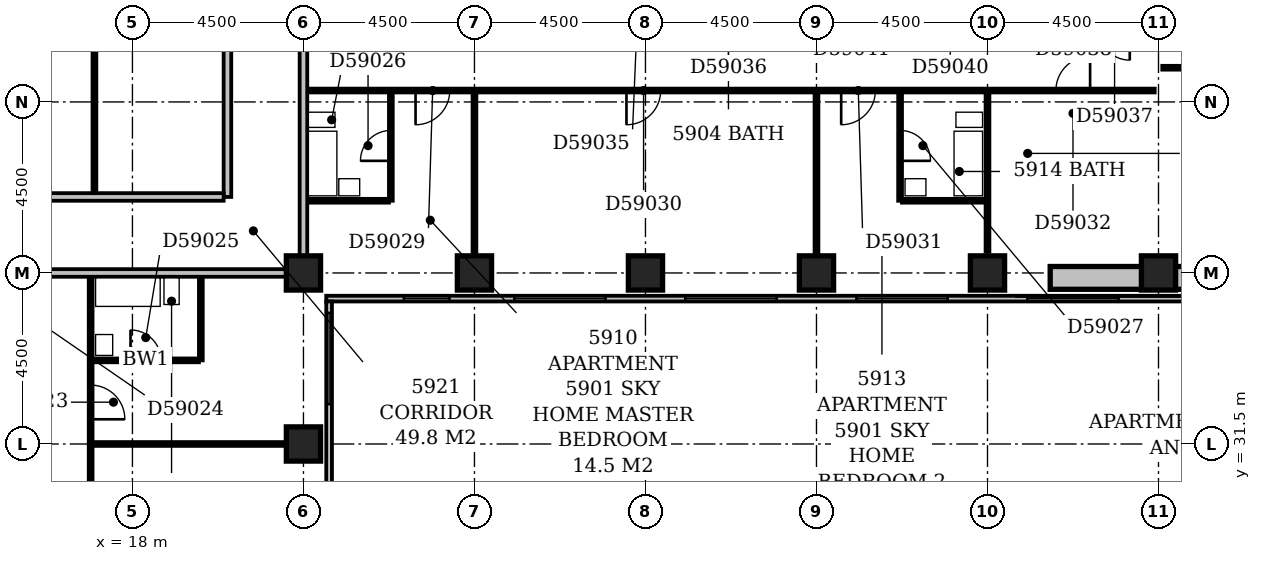
"""IFC4 building model, lengths in metres.
Left out: names, types, materials, properties, quantities, classifications, styles, units other than length and angle.
Written with IfcOpenShell. Run it as: python <this file> out.ifc"""

import sys

from ifc_helpers import new_model, si_unit, direction, frame, frame_2d, origin, origin_2d, place, context, subcontext, project, spatial, rectangle, extrude, element, fill, save


model = new_model("IFC4")
c1 = context("Model", 3, precision=1e-05, world=origin(), true_north=direction((0.0, 1.0)))
c2 = subcontext(c1, "Body", "Model", "MODEL_VIEW")
j1 = project(units=[si_unit("LENGTHUNIT", "METRE"), si_unit("PLANEANGLEUNIT", "RADIAN")], contexts=[c1])
p1 = place(None, origin())
s1 = spatial("IfcSite", under=j1, at=p1, CompositionType="ELEMENT")
p2 = place(p1, origin())
s2 = spatial("IfcBuilding", under=s1, at=p2, CompositionType="ELEMENT")
p3 = place(p2, frame((0.0, 0.0, 229.4)))
s3 = spatial("IfcBuildingStorey", under=s2, at=p3, CompositionType="ELEMENT", Elevation=229.4)
for number, where, z_axis, x_axis in (
    (1, (22.5, 31.5, -0.3), (0.0, 0.0, 1.0), (1.0, 0.0, 0.0)),
    (2, (22.5, 36.0, -0.3), (0.0, 0.0, 1.0), (1.0, 0.0, 0.0)),
    (3, (27.0, 36.0, -0.3), (0.0, 0.0, 1.0), (1.0, 0.0, 0.0)),
    (4, (31.5, 36.0, -0.3), (0.0, 0.0, 1.0), (1.0, 0.0, 0.0)),
    (5, (36.0, 36.0, -0.3), (0.0, 0.0, 1.0), (1.0, 0.0, 0.0)),
    (6, (40.5, 36.0, -0.3), (0.0, 0.0, 1.0), (1.0, 0.0, 0.0)),
    (7, (45.0, 36.0, -0.3), (0.0, 0.0, 1.0), (1.0, 0.0, 0.0)),
):
    element("IfcColumn", number, at=place(p3, frame(where, z_axis=z_axis, x_axis=x_axis)), inside=s3, PredefinedType="COLUMN", context=c2, shape_type="SweptSolid", body=[
        extrude(rectangle(XDim=0.9, YDim=0.9, at=origin_2d()), origin(), (0.0, 0.0, 1.0), 3.55),
    ])
p4 = place(p3, frame((23.175, 17.4, 0.0), z_axis=(0.0, 0.0, 1.0), x_axis=(0.0, 1.0, 0.0)))
e8 = element("IfcWall", 8, at=p4, inside=s3, PredefinedType="STANDARD", context=c2, shape_type="SweptSolid", body=[
    extrude(rectangle(XDim=17.85, YDim=0.15, at=frame_2d((8.925, 0.0))), origin(), (0.0, 0.0, 1.0), 2.7),
])
p5 = place(p4, frame((2.876, 0.0, 0.6)))
e9 = element("IfcOpeningElement", 9, at=p5, cuts=e8, PredefinedType="OPENING", context=c2, shape_type="SweptSolid", body=[
    extrude(rectangle(XDim=1.5, YDim=1.8, at=frame_2d((0.75, 0.9))), frame((0.0, 0.087, 0.0), z_axis=(0.0, -1.0, 0.0), x_axis=(1.0, 0.0, 0.0)), (0.0, 0.0, 1.0), 0.174),
])
p6 = place(p4, frame((6.15, 0.0, 0.6)))
e10 = element("IfcOpeningElement", 10, at=p6, cuts=e8, PredefinedType="OPENING", context=c2, shape_type="SweptSolid", body=[
    extrude(rectangle(XDim=2.4, YDim=1.8, at=frame_2d((1.2, 0.9))), frame((0.0, 0.087, 0.0), z_axis=(0.0, -1.0, 0.0), x_axis=(1.0, 0.0, 0.0)), (0.0, 0.0, 1.0), 0.174),
])
p7 = place(p4, frame((10.65, 0.0, 0.6)))
e11 = element("IfcOpeningElement", 11, at=p7, cuts=e8, PredefinedType="OPENING", context=c2, shape_type="SweptSolid", body=[
    extrude(rectangle(XDim=2.4, YDim=1.8, at=frame_2d((1.2, 0.9))), frame((0.0, 0.087, 0.0), z_axis=(0.0, -1.0, 0.0), x_axis=(1.0, 0.0, 0.0)), (0.0, 0.0, 1.0), 0.174),
])
p8 = place(p4, frame((15.15, 0.0, 0.6)))
e12 = element("IfcOpeningElement", 12, at=p8, cuts=e8, PredefinedType="OPENING", context=c2, shape_type="SweptSolid", body=[
    extrude(rectangle(XDim=2.4, YDim=1.8, at=frame_2d((1.2, 0.9))), frame((0.0, 0.087, 0.0), z_axis=(0.0, -1.0, 0.0), x_axis=(1.0, 0.0, 0.0)), (0.0, 0.0, 1.0), 0.174),
])
p9 = place(p3, frame((23.1, 35.325, 0.0), z_axis=(0.0, 0.0, 1.0), x_axis=(1.0, 0.0, 0.0)))
e13 = element("IfcWall", 13, at=p9, inside=s3, PredefinedType="STANDARD", context=c2, shape_type="SweptSolid", body=[
    extrude(rectangle(XDim=27.15, YDim=0.15, at=frame_2d((13.575, 0.0))), origin(), (0.0, 0.0, 1.0), 2.7),
])
p10 = place(p9, frame((2.043, 0.0, 0.6)))
e14 = element("IfcOpeningElement", 14, at=p10, cuts=e13, PredefinedType="OPENING", context=c2, shape_type="SweptSolid", body=[
    extrude(rectangle(XDim=1.2, YDim=1.8, at=frame_2d((0.6, 0.9))), frame((0.0, 0.087, 0.0), z_axis=(0.0, -1.0, 0.0), x_axis=(1.0, 0.0, 0.0)), (0.0, 0.0, 1.0), 0.174),
])
p11 = place(p9, frame((4.95, 0.0, 0.6)))
e15 = element("IfcOpeningElement", 15, at=p11, cuts=e13, PredefinedType="OPENING", context=c2, shape_type="SweptSolid", body=[
    extrude(rectangle(XDim=2.4, YDim=1.8, at=frame_2d((1.2, 0.9))), frame((0.0, 0.087, 0.0), z_axis=(0.0, -1.0, 0.0), x_axis=(1.0, 0.0, 0.0)), (0.0, 0.0, 1.0), 0.174),
])
p12 = place(p9, frame((9.45, 0.0, 0.6)))
e16 = element("IfcOpeningElement", 16, at=p12, cuts=e13, PredefinedType="OPENING", context=c2, shape_type="SweptSolid", body=[
    extrude(rectangle(XDim=2.4, YDim=1.8, at=frame_2d((1.2, 0.9))), frame((0.0, 0.087, 0.0), z_axis=(0.0, -1.0, 0.0), x_axis=(1.0, 0.0, 0.0)), (0.0, 0.0, 1.0), 0.174),
])
p13 = place(p9, frame((13.95, 0.0, 0.6)))
e17 = element("IfcOpeningElement", 17, at=p13, cuts=e13, PredefinedType="OPENING", context=c2, shape_type="SweptSolid", body=[
    extrude(rectangle(XDim=2.4, YDim=1.8, at=frame_2d((1.2, 0.9))), frame((0.0, 0.087, 0.0), z_axis=(0.0, -1.0, 0.0), x_axis=(1.0, 0.0, 0.0)), (0.0, 0.0, 1.0), 0.174),
])
p14 = place(p9, frame((18.45, 0.0, 0.6)))
e18 = element("IfcOpeningElement", 18, at=p14, cuts=e13, PredefinedType="OPENING", context=c2, shape_type="SweptSolid", body=[
    extrude(rectangle(XDim=2.4, YDim=1.8, at=frame_2d((1.2, 0.9))), frame((0.0, 0.087, 0.0), z_axis=(0.0, -1.0, 0.0), x_axis=(1.0, 0.0, 0.0)), (0.0, 0.0, 1.0), 0.174),
])
p15 = place(p9, frame((22.68, 0.0, 0.6)))
e19 = element("IfcOpeningElement", 19, at=p15, cuts=e13, PredefinedType="OPENING", context=c2, shape_type="SweptSolid", body=[
    extrude(rectangle(XDim=1.8, YDim=1.8, at=frame_2d((0.9, 0.9))), frame((0.0, 0.087, 0.0), z_axis=(0.0, -1.0, 0.0), x_axis=(1.0, 0.0, 0.0)), (0.0, 0.0, 1.0), 0.174),
])
p16 = place(p3, frame((49.53, 35.87, 3.6), z_axis=(0.0, 0.0, 1.0), x_axis=(-1.0, 0.0, 0.0)))
e20 = element("IfcWall", 20, at=p16, inside=s3, PredefinedType="STANDARD", context=c2, shape_type="SweptSolid", body=[
    extrude(rectangle(XDim=7.38, YDim=0.6, at=frame_2d((3.69, 0.0))), origin(), (0.0, 0.0, 1.0), 0.6),
])
p17 = place(p3, frame((16.9, 27.1, 0.0), z_axis=(0.0, 0.0, 1.0), x_axis=(0.0, 1.0, 0.0)))
e21 = element("IfcWall", 21, at=p17, inside=s3, PredefinedType="PARTITIONING", context=c2, shape_type="SweptSolid", body=[
    extrude(rectangle(XDim=8.8, YDim=0.1, at=frame_2d((4.4, 0.0))), origin(), (0.0, 0.0, 1.0), 3.25),
])
p18 = place(p17, frame((1.7, 0.0, 0.0)))
e22 = element("IfcOpeningElement", 22, at=p18, cuts=e21, PredefinedType="OPENING", context=c2, shape_type="SweptSolid", body=[
    extrude(rectangle(XDim=0.9, YDim=2.1, at=frame_2d((0.45, 1.05))), frame((0.0, 0.062, 0.0), z_axis=(0.0, -1.0, 0.0), x_axis=(1.0, 0.0, 0.0)), (0.0, 0.0, 1.0), 0.124),
])
p19 = place(p17, frame((5.05, 0.0, 0.0)))
e23 = element("IfcOpeningElement", 23, at=p19, cuts=e21, PredefinedType="OPENING", context=c2, shape_type="SweptSolid", body=[
    extrude(rectangle(XDim=0.9, YDim=2.1, at=frame_2d((0.45, 1.05))), frame((0.0, 0.062, 0.0), z_axis=(0.0, -1.0, 0.0), x_axis=(1.0, 0.0, 0.0)), (0.0, 0.0, 1.0), 0.124),
])
p20 = place(p3, frame((16.95, 31.5, 0.0), z_axis=(0.0, 0.0, 1.0), x_axis=(1.0, 0.0, 0.0)))
e24 = element("IfcWall", 24, at=p20, inside=s3, PredefinedType="PARTITIONING", context=c2, shape_type="SweptSolid", body=[
    extrude(rectangle(XDim=5.1, YDim=0.1, at=frame_2d((2.55, 0.0))), origin(), (0.0, 0.0, 1.0), 3.25),
])
p21 = place(p3, frame((16.95, 33.7, 0.0), z_axis=(0.0, 0.0, 1.0), x_axis=(1.0, 0.0, 0.0)))
e25 = element("IfcWall", 25, at=p21, inside=s3, PredefinedType="PLUMBINGWALL", context=c2, shape_type="SweptSolid", body=[
    extrude(rectangle(XDim=2.8, YDim=0.1, at=frame_2d((1.4, 0.0))), origin(), (0.0, 0.0, 1.0), 3.25),
])
p22 = place(p21, frame((1.0, 0.0, 0.0)))
e26 = element("IfcOpeningElement", 26, at=p22, cuts=e25, PredefinedType="OPENING", context=c2, shape_type="SweptSolid", body=[
    extrude(rectangle(XDim=0.8, YDim=2.1, at=frame_2d((0.4, 1.05))), frame((0.0, 0.062, 0.0), z_axis=(0.0, -1.0, 0.0), x_axis=(1.0, 0.0, 0.0)), (0.0, 0.0, 1.0), 0.124),
])
p23 = place(p3, frame((19.8, 33.7, 0.0), z_axis=(0.0, 0.0, 1.0), x_axis=(0.0, 1.0, 0.0)))
e27 = element("IfcWall", 27, at=p23, inside=s3, PredefinedType="PLUMBINGWALL", context=c2, shape_type="SweptSolid", body=[
    extrude(rectangle(XDim=2.2, YDim=0.1, at=frame_2d((1.1, 0.0))), origin(), (0.0, 0.0, 1.0), 3.25),
])
p24 = place(p3, frame((9.1, 36.0, 0.0), z_axis=(0.0, 0.0, 1.0), x_axis=(1.0, 0.0, 0.0)))
e28 = element("IfcWall", 28, at=p24, inside=s3, PredefinedType="PARTITIONING", context=c2, shape_type="SweptSolid", body=[
    extrude(rectangle(XDim=12.95, YDim=0.2, at=frame_2d((6.475, 0.0))), origin(), (0.0, 0.0, 1.0), 3.25),
])
p25 = place(p3, frame((22.5, 36.45, 0.0), z_axis=(0.0, 0.0, 1.0), x_axis=(0.0, 1.0, 0.0)))
e29 = element("IfcWall", 29, at=p25, inside=s3, PredefinedType="PARTITIONING", context=c2, shape_type="SweptSolid", body=[
    extrude(rectangle(XDim=13.05, YDim=0.2, at=frame_2d((6.525, 0.0))), origin(), (0.0, 0.0, 1.0), 3.25),
])
for number, where, z_axis, x_axis in (
    (30, (27.0, 36.45, 0.0), (0.0, 0.0, 1.0), (0.0, 1.0, 0.0)),
    (31, (36.0, 36.45, 0.0), (0.0, 0.0, 1.0), (0.0, 1.0, 0.0)),
):
    element("IfcWall", number, at=place(p3, frame(where, z_axis=z_axis, x_axis=x_axis)), inside=s3, PredefinedType="PARTITIONING", context=c2, shape_type="SweptSolid", body=[
        extrude(rectangle(XDim=4.3, YDim=0.1, at=frame_2d((2.15, 0.0))), origin(), (0.0, 0.0, 1.0), 2.35),
    ])
p26 = place(p3, frame((40.5, 36.566, 0.0), z_axis=(0.0, 0.0, 1.0), x_axis=(0.0, 1.0, 0.0)))
e32 = element("IfcWall", 32, at=p26, inside=s3, PredefinedType="PARTITIONING", context=c2, shape_type="SweptSolid", body=[
    extrude(rectangle(XDim=4.184, YDim=0.1, at=frame_2d((2.092, 0.0))), origin(), (0.0, 0.0, 1.0), 3.25),
])
p27 = place(p3, frame((22.6, 37.9, 0.0), z_axis=(0.0, 0.0, 1.0), x_axis=(1.0, 0.0, 0.0)))
e33 = element("IfcWall", 33, at=p27, inside=s3, PredefinedType="PLUMBINGWALL", context=c2, shape_type="SweptSolid", body=[
    extrude(rectangle(XDim=2.15, YDim=0.1, at=frame_2d((1.075, 0.0))), origin(), (0.0, 0.0, 1.0), 3.25),
])
p28 = place(p3, frame((24.8, 37.9, 0.0), z_axis=(0.0, 0.0, 1.0), x_axis=(0.0, 1.0, 0.0)))
e34 = element("IfcWall", 34, at=p28, inside=s3, PredefinedType="PLUMBINGWALL", context=c2, shape_type="SweptSolid", body=[
    extrude(rectangle(XDim=2.85, YDim=0.1, at=frame_2d((1.425, 0.0))), origin(), (0.0, 0.0, 1.0), 3.25),
])
p29 = place(p28, frame((1.05, 0.0, 0.0)))
e35 = element("IfcOpeningElement", 35, at=p29, cuts=e34, PredefinedType="OPENING", context=c2, shape_type="SweptSolid", body=[
    extrude(rectangle(XDim=0.8, YDim=2.1, at=frame_2d((0.4, 1.05))), frame((0.0, 0.062, 0.0), z_axis=(0.0, -1.0, 0.0), x_axis=(1.0, 0.0, 0.0)), (0.0, 0.0, 1.0), 0.124),
])
p30 = place(p3, frame((38.2, 37.9, 0.0), z_axis=(0.0, 0.0, 1.0), x_axis=(0.0, 1.0, 0.0)))
e36 = element("IfcWall", 36, at=p30, inside=s3, PredefinedType="PLUMBINGWALL", context=c2, shape_type="SweptSolid", body=[
    extrude(rectangle(XDim=2.85, YDim=0.1, at=frame_2d((1.425, 0.0))), origin(), (0.0, 0.0, 1.0), 3.25),
])
p31 = place(p30, frame((1.05, 0.0, 0.0)))
e37 = element("IfcOpeningElement", 37, at=p31, cuts=e36, PredefinedType="OPENING", context=c2, shape_type="SweptSolid", body=[
    extrude(rectangle(XDim=0.8, YDim=2.1, at=frame_2d((0.4, 1.05))), frame((0.0, 0.062, 0.0), z_axis=(0.0, -1.0, 0.0), x_axis=(1.0, 0.0, 0.0)), (0.0, 0.0, 1.0), 0.124),
])
p32 = place(p3, frame((38.25, 37.9, 0.0), z_axis=(0.0, 0.0, 1.0), x_axis=(1.0, 0.0, 0.0)))
e38 = element("IfcWall", 38, at=p32, inside=s3, PredefinedType="PLUMBINGWALL", context=c2, shape_type="SweptSolid", body=[
    extrude(rectangle(XDim=2.2, YDim=0.1, at=frame_2d((1.1, 0.0))), origin(), (0.0, 0.0, 1.0), 3.25),
])
p33 = place(p3, frame((9.1, 38.0, 0.0), z_axis=(0.0, 0.0, 1.0), x_axis=(1.0, 0.0, 0.0)))
e39 = element("IfcWall", 39, at=p33, inside=s3, PredefinedType="PARTITIONING", context=c2, shape_type="SweptSolid", body=[
    extrude(rectangle(XDim=11.3, YDim=0.2, at=frame_2d((5.65, 0.0))), origin(), (0.0, 0.0, 1.0), 3.25),
])
p34 = place(p3, frame((20.5, 38.0, 0.0), z_axis=(0.0, 0.0, 1.0), x_axis=(0.0, 1.0, 0.0)))
e40 = element("IfcWall", 40, at=p34, inside=s3, PredefinedType="PARTITIONING", context=c2, shape_type="SweptSolid", body=[
    extrude(rectangle(XDim=11.5, YDim=0.2, at=frame_2d((5.75, 0.0))), origin(), (0.0, 0.0, 1.0), 3.25),
])
p35 = place(p3, frame((17.0, 38.1, 0.0), z_axis=(0.0, 0.0, 1.0), x_axis=(0.0, 1.0, 0.0)))
e41 = element("IfcWall", 41, at=p35, inside=s3, PredefinedType="PARTITIONING", context=c2, shape_type="SweptSolid", body=[
    extrude(rectangle(XDim=11.3, YDim=0.1, at=frame_2d((5.65, 0.0))), origin(), (0.0, 0.0, 1.0), 3.25),
])
p36 = place(p3, frame((22.6, 40.8, 0.0), z_axis=(0.0, 0.0, 1.0), x_axis=(1.0, 0.0, 0.0)))
e42 = element("IfcWall", 42, at=p36, inside=s3, PredefinedType="PARTITIONING", context=c2, shape_type="SweptSolid", body=[
    extrude(rectangle(XDim=22.3, YDim=0.1, at=frame_2d((11.15, 0.0))), origin(), (0.0, 0.0, 1.0), 3.25),
])
p37 = place(p36, frame((2.85, 0.0, 0.0)))
e43 = element("IfcOpeningElement", 43, at=p37, cuts=e42, PredefinedType="OPENING", context=c2, shape_type="SweptSolid", body=[
    extrude(rectangle(XDim=0.9, YDim=2.1, at=frame_2d((0.45, 1.05))), frame((0.0, 0.062, 0.0), z_axis=(0.0, -1.0, 0.0), x_axis=(1.0, 0.0, 0.0)), (0.0, 0.0, 1.0), 0.124),
])
p38 = place(p36, frame((8.4, 0.0, 0.0)))
e44 = element("IfcOpeningElement", 44, at=p38, cuts=e42, PredefinedType="OPENING", context=c2, shape_type="SweptSolid", body=[
    extrude(rectangle(XDim=0.9, YDim=2.1, at=frame_2d((0.45, 1.05))), frame((0.0, 0.062, 0.0), z_axis=(0.0, -1.0, 0.0), x_axis=(1.0, 0.0, 0.0)), (0.0, 0.0, 1.0), 0.124),
])
p39 = place(p36, frame((14.05, 0.0, 0.0)))
e45 = element("IfcOpeningElement", 45, at=p39, cuts=e42, PredefinedType="OPENING", context=c2, shape_type="SweptSolid", body=[
    extrude(rectangle(XDim=0.9, YDim=2.1, at=frame_2d((0.45, 1.05))), frame((0.0, 0.062, 0.0), z_axis=(0.0, -1.0, 0.0), x_axis=(1.0, 0.0, 0.0)), (0.0, 0.0, 1.0), 0.124),
])
p40 = place(p36, frame((19.7, 0.0, 0.0)))
e46 = element("IfcOpeningElement", 46, at=p40, cuts=e42, PredefinedType="OPENING", context=c2, shape_type="SweptSolid", body=[
    extrude(rectangle(XDim=0.9, YDim=2.1, at=frame_2d((0.45, 1.05))), frame((0.0, 0.062, 0.0), z_axis=(0.0, -1.0, 0.0), x_axis=(1.0, 0.0, 0.0)), (0.0, 0.0, 1.0), 0.124),
])
p41 = place(p3, frame((45.1, 41.4, 0.0), z_axis=(0.0, 0.0, 1.0), x_axis=(1.0, 0.0, 0.0)))
e47 = element("IfcWall", 47, at=p41, inside=s3, PredefinedType="PARTITIONING", context=c2, shape_type="SweptSolid", body=[
    extrude(rectangle(XDim=9.5, YDim=0.1, at=frame_2d((4.75, 0.0))), origin(), (0.0, 0.0, 1.0), 3.25),
])
p42 = place(p41, frame((3.95, 0.0, 0.0)))
e48 = element("IfcOpeningElement", 48, at=p42, cuts=e47, PredefinedType="OPENING", context=c2, shape_type="SweptSolid", body=[
    extrude(rectangle(XDim=0.9, YDim=2.1, at=frame_2d((0.45, 1.05))), frame((0.0, 0.062, 0.0), z_axis=(0.0, -1.0, 0.0), x_axis=(1.0, 0.0, 0.0)), (0.0, 0.0, 1.0), 0.124),
])
p43 = place(p8, origin())
e49 = element("IfcWindow", 49, at=p43, inside=s3, PartitioningType="SINGLE_PANEL", PredefinedType="WINDOW", context=c2, shape_type="SweptSolid", body=[
    extrude(rectangle(XDim=2.4, YDim=1.8, at=frame_2d((1.2, 0.9))), frame((0.0, 0.03, 0.0), z_axis=(0.0, -1.0, 0.0), x_axis=(1.0, 0.0, 0.0)), (0.0, 0.0, 1.0), 0.06),
])
fill(e12, e49)
p44 = place(p10, origin())
e50 = element("IfcWindow", 50, at=p44, inside=s3, PartitioningType="SINGLE_PANEL", PredefinedType="WINDOW", context=c2, shape_type="SweptSolid", body=[
    extrude(rectangle(XDim=1.2, YDim=1.8, at=frame_2d((0.6, 0.9))), frame((0.0, 0.03, 0.0), z_axis=(0.0, -1.0, 0.0), x_axis=(1.0, 0.0, 0.0)), (0.0, 0.0, 1.0), 0.06),
])
fill(e14, e50)
p45 = place(p11, origin())
e51 = element("IfcWindow", 51, at=p45, inside=s3, PartitioningType="SINGLE_PANEL", PredefinedType="WINDOW", context=c2, shape_type="SweptSolid", body=[
    extrude(rectangle(XDim=2.4, YDim=1.8, at=frame_2d((1.2, 0.9))), frame((0.0, 0.03, 0.0), z_axis=(0.0, -1.0, 0.0), x_axis=(1.0, 0.0, 0.0)), (0.0, 0.0, 1.0), 0.06),
])
fill(e15, e51)
p46 = place(p12, origin())
e52 = element("IfcWindow", 52, at=p46, inside=s3, PartitioningType="SINGLE_PANEL", PredefinedType="WINDOW", context=c2, shape_type="SweptSolid", body=[
    extrude(rectangle(XDim=2.4, YDim=1.8, at=frame_2d((1.2, 0.9))), frame((0.0, 0.03, 0.0), z_axis=(0.0, -1.0, 0.0), x_axis=(1.0, 0.0, 0.0)), (0.0, 0.0, 1.0), 0.06),
])
fill(e16, e52)
p47 = place(p13, origin())
e53 = element("IfcWindow", 53, at=p47, inside=s3, PartitioningType="SINGLE_PANEL", PredefinedType="WINDOW", context=c2, shape_type="SweptSolid", body=[
    extrude(rectangle(XDim=2.4, YDim=1.8, at=frame_2d((1.2, 0.9))), frame((0.0, 0.03, 0.0), z_axis=(0.0, -1.0, 0.0), x_axis=(1.0, 0.0, 0.0)), (0.0, 0.0, 1.0), 0.06),
])
fill(e17, e53)
p48 = place(p14, origin())
e54 = element("IfcWindow", 54, at=p48, inside=s3, PartitioningType="SINGLE_PANEL", PredefinedType="WINDOW", context=c2, shape_type="SweptSolid", body=[
    extrude(rectangle(XDim=2.4, YDim=1.8, at=frame_2d((1.2, 0.9))), frame((0.0, 0.03, 0.0), z_axis=(0.0, -1.0, 0.0), x_axis=(1.0, 0.0, 0.0)), (0.0, 0.0, 1.0), 0.06),
])
fill(e18, e54)
p49 = place(p19, frame((0.9, 0.0, 0.0), z_axis=(0.0, 0.0, 1.0), x_axis=(-1.0, 0.0, 0.0)))
e55 = element("IfcDoor", 55, at=p49, inside=s3, OperationType="SINGLE_SWING_RIGHT", PredefinedType="DOOR", context=c2, shape_type="SweptSolid", body=[
    extrude(rectangle(XDim=0.9, YDim=2.1, at=frame_2d((0.45, 1.05))), frame((0.0, 0.025, 0.0), z_axis=(0.0, -1.0, 0.0), x_axis=(1.0, 0.0, 0.0)), (0.0, 0.0, 1.0), 0.05),
])
fill(e23, e55)
p50 = place(p22, origin())
e56 = element("IfcDoor", 56, at=p50, inside=s3, OperationType="SINGLE_SWING_LEFT", PredefinedType="DOOR", context=c2, shape_type="SweptSolid", body=[
    extrude(rectangle(XDim=0.8, YDim=2.1, at=frame_2d((0.4, 1.05))), frame((0.0, 0.025, 0.0), z_axis=(0.0, -1.0, 0.0), x_axis=(1.0, 0.0, 0.0)), (0.0, 0.0, 1.0), 0.05),
])
fill(e26, e56)
p51 = place(p29, origin())
e57 = element("IfcDoor", 57, at=p51, inside=s3, OperationType="SINGLE_SWING_LEFT", PredefinedType="DOOR", context=c2, shape_type="SweptSolid", body=[
    extrude(rectangle(XDim=0.8, YDim=2.1, at=frame_2d((0.4, 1.05))), frame((0.0, 0.025, 0.0), z_axis=(0.0, -1.0, 0.0), x_axis=(1.0, 0.0, 0.0)), (0.0, 0.0, 1.0), 0.05),
])
fill(e35, e57)
p52 = place(p31, frame((0.8, 0.0, 0.0), z_axis=(0.0, 0.0, 1.0), x_axis=(-1.0, 0.0, 0.0)))
e58 = element("IfcDoor", 58, at=p52, inside=s3, OperationType="SINGLE_SWING_RIGHT", PredefinedType="DOOR", context=c2, shape_type="SweptSolid", body=[
    extrude(rectangle(XDim=0.8, YDim=2.1, at=frame_2d((0.4, 1.05))), frame((0.0, 0.025, 0.0), z_axis=(0.0, -1.0, 0.0), x_axis=(1.0, 0.0, 0.0)), (0.0, 0.0, 1.0), 0.05),
])
fill(e37, e58)
p53 = place(p37, frame((0.9, 0.0, 0.0), z_axis=(0.0, 0.0, 1.0), x_axis=(-1.0, 0.0, 0.0)))
e59 = element("IfcDoor", 59, at=p53, inside=s3, OperationType="SINGLE_SWING_RIGHT", PredefinedType="DOOR", context=c2, shape_type="SweptSolid", body=[
    extrude(rectangle(XDim=0.9, YDim=2.1, at=frame_2d((0.45, 1.05))), frame((0.0, 0.025, 0.0), z_axis=(0.0, -1.0, 0.0), x_axis=(1.0, 0.0, 0.0)), (0.0, 0.0, 1.0), 0.05),
])
fill(e43, e59)
p54 = place(p38, frame((0.9, 0.0, 0.0), z_axis=(0.0, 0.0, 1.0), x_axis=(-1.0, 0.0, 0.0)))
e60 = element("IfcDoor", 60, at=p54, inside=s3, OperationType="SINGLE_SWING_RIGHT", PredefinedType="DOOR", context=c2, shape_type="SweptSolid", body=[
    extrude(rectangle(XDim=0.9, YDim=2.1, at=frame_2d((0.45, 1.05))), frame((0.0, 0.025, 0.0), z_axis=(0.0, -1.0, 0.0), x_axis=(1.0, 0.0, 0.0)), (0.0, 0.0, 1.0), 0.05),
])
fill(e44, e60)
p55 = place(p39, frame((0.9, 0.0, 0.0), z_axis=(0.0, 0.0, 1.0), x_axis=(-1.0, 0.0, 0.0)))
e61 = element("IfcDoor", 61, at=p55, inside=s3, OperationType="SINGLE_SWING_RIGHT", PredefinedType="DOOR", context=c2, shape_type="SweptSolid", body=[
    extrude(rectangle(XDim=0.9, YDim=2.1, at=frame_2d((0.45, 1.05))), frame((0.0, 0.025, 0.0), z_axis=(0.0, -1.0, 0.0), x_axis=(1.0, 0.0, 0.0)), (0.0, 0.0, 1.0), 0.05),
])
fill(e45, e61)
p56 = place(p40, frame((0.9, 0.0, 0.0), z_axis=(0.0, 0.0, 1.0), x_axis=(-1.0, 0.0, 0.0)))
e62 = element("IfcDoor", 62, at=p56, inside=s3, OperationType="SINGLE_SWING_LEFT", PredefinedType="DOOR", context=c2, shape_type="SweptSolid", body=[
    extrude(rectangle(XDim=0.9, YDim=2.1, at=frame_2d((0.45, 1.05))), frame((0.0, 0.025, 0.0), z_axis=(0.0, -1.0, 0.0), x_axis=(1.0, 0.0, 0.0)), (0.0, 0.0, 1.0), 0.05),
])
fill(e46, e62)
save(model, sys.argv[1])
